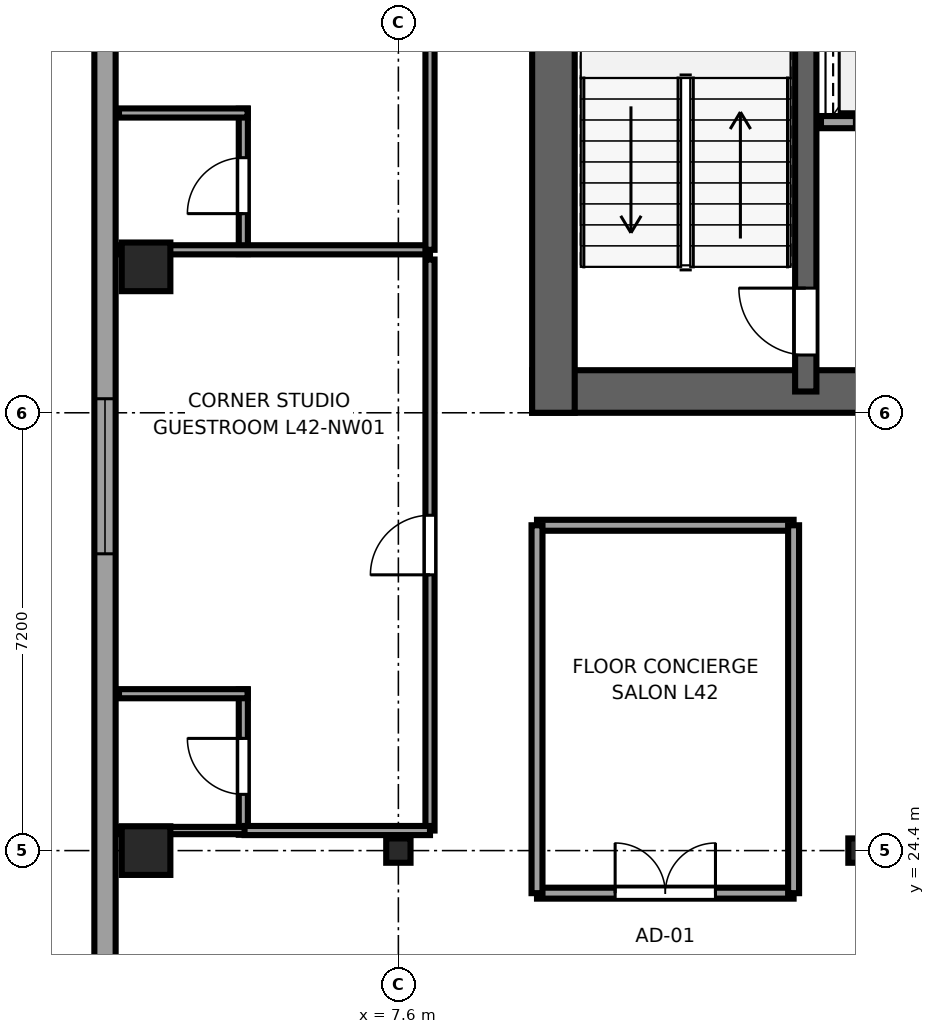
"""IFC4 building model, lengths in metres.
Left out: names, types, materials, properties, quantities, classifications, styles, units other than length and angle.
Written with IfcOpenShell. Run it as: python <this file> out.ifc"""

import sys

from ifc_helpers import new_model, si_unit, direction, frame, frame_2d, origin, origin_2d, place, context, subcontext, project, spatial, rectangle, i_section, extrude, source, transform, mapped, element, fill, save


model = new_model("IFC4")
c1 = context("Model", 3, precision=1e-05, world=origin(), true_north=direction((0.0, 1.0)))
c2 = subcontext(c1, "Body", "Model", "MODEL_VIEW")
j1 = project(units=[si_unit("LENGTHUNIT", "METRE"), si_unit("PLANEANGLEUNIT", "RADIAN")], contexts=[c1])
p1 = place(None, origin())
s1 = spatial("IfcSite", under=j1, at=p1, CompositionType="ELEMENT")
p2 = place(p1, origin())
s2 = spatial("IfcBuilding", under=s1, at=p2, CompositionType="ELEMENT")
p3 = place(p2, frame((0.0, 0.0, 161.25)))
s3 = spatial("IfcBuildingStorey", under=s2, at=p3, CompositionType="ELEMENT", Elevation=161.25)
p4 = place(p3, frame((9.8, 31.95, 0.0), z_axis=(0.0, 0.0, 1.0), x_axis=(1.0, 0.0, 0.0)))
e1 = element("IfcWall", 1, at=p4, inside=s3, PredefinedType="SHEAR", context=c2, shape_type="SweptSolid", body=[
    extrude(rectangle(XDim=26.4, YDim=0.7, at=frame_2d((13.2, 0.0))), origin(), (0.0, 0.0, 1.0), 3.55),
])
p5 = place(p4, frame((7.65, 0.0, 0.0), z_axis=(0.0, 0.0, 1.0), x_axis=(-1.0, 0.0, 0.0)))
e2 = element("IfcOpeningElement", 2, at=p5, cuts=e1, PredefinedType="OPENING", context=c2, shape_type="SweptSolid", body=[
    extrude(rectangle(XDim=1.5, YDim=2.04, at=frame_2d((0.75, 1.02))), frame((0.0, 0.36, 0.0), z_axis=(0.0, -1.0, 0.0), x_axis=(1.0, 0.0, 0.0)), (0.0, 0.0, 1.0), 0.72),
])
p6 = place(p4, frame((13.95, 0.0, 0.0), z_axis=(0.0, 0.0, 1.0), x_axis=(-1.0, 0.0, 0.0)))
e3 = element("IfcOpeningElement", 3, at=p6, cuts=e1, PredefinedType="OPENING", context=c2, shape_type="SweptSolid", body=[
    extrude(rectangle(XDim=1.5, YDim=2.04, at=frame_2d((0.75, 1.02))), frame((0.0, 0.36, 0.0), z_axis=(0.0, -1.0, 0.0), x_axis=(1.0, 0.0, 0.0)), (0.0, 0.0, 1.0), 0.72),
])
p7 = place(p4, frame((20.25, 0.0, 0.0), z_axis=(0.0, 0.0, 1.0), x_axis=(-1.0, 0.0, 0.0)))
e4 = element("IfcOpeningElement", 4, at=p7, cuts=e1, PredefinedType="OPENING", context=c2, shape_type="SweptSolid", body=[
    extrude(rectangle(XDim=1.5, YDim=2.04, at=frame_2d((0.75, 1.02))), frame((0.0, 0.36, 0.0), z_axis=(0.0, -1.0, 0.0), x_axis=(1.0, 0.0, 0.0)), (0.0, 0.0, 1.0), 0.72),
])
p8 = place(p3, frame((10.15, 31.6, 0.0), z_axis=(0.0, 0.0, 1.0), x_axis=(0.0, 1.0, 0.0)))
e5 = element("IfcWall", 5, at=p8, inside=s3, PredefinedType="SHEAR", context=c2, shape_type="SweptSolid", body=[
    extrude(rectangle(XDim=13.6, YDim=0.7, at=frame_2d((6.8, 0.0))), origin(), (0.0, 0.0, 1.0), 3.55),
])
p9 = place(p3, frame((14.3, 31.95, 0.0), z_axis=(0.0, 0.0, 1.0), x_axis=(0.0, 1.0, 0.0)))
e6 = element("IfcWall", 6, at=p9, inside=s3, PredefinedType="SHEAR", context=c2, shape_type="SweptSolid", body=[
    extrude(rectangle(XDim=12.9, YDim=0.35, at=frame_2d((6.45, 0.0))), origin(), (0.0, 0.0, 1.0), 3.55),
])
p10 = place(p9, frame((0.6, 0.0, 0.0)))
e7 = element("IfcOpeningElement", 7, at=p10, cuts=e6, PredefinedType="OPENING", context=c2, shape_type="SweptSolid", body=[
    extrude(rectangle(XDim=1.1, YDim=2.12, at=frame_2d((0.55, 1.06))), frame((0.0, 0.185, 0.0), z_axis=(0.0, -1.0, 0.0), x_axis=(1.0, 0.0, 0.0)), (0.0, 0.0, 1.0), 0.37),
])
m1 = source(origin(), c2, "Body", "SweptSolid", [
    extrude(rectangle(XDim=0.8, YDim=0.8, at=origin_2d()), origin(), (0.0, 0.0, 1.0), 3.55),
])
p11 = place(p3, frame((3.45, 24.4, 0.0), z_axis=(0.0, 0.0, 1.0), x_axis=(1.0, 0.0, 0.0)))
e8 = element("IfcColumn", 8, at=p11, inside=s3, PredefinedType="COLUMN", context=c2, shape_type="MappedRepresentation", body=[
    mapped(m1, transform((0.0, 0.0, 0.0), x_axis=(1.0, 0.0, 0.0), y_axis=(0.0, 1.0, 0.0), z_axis=(0.0, 0.0, 1.0), scale=1.0)),
])
m2 = source(origin(), c2, "Body", "SweptSolid", [
    extrude(i_section(OverallWidth=0.4, OverallDepth=0.4, WebThickness=0.02, FlangeThickness=0.035, at=origin_2d()), origin(), (0.0, 0.0, 1.0), 3.55),
])
for number, where, z_axis, x_axis in (
    (9, (7.6, 24.4, 0.0), (0.0, 0.0, 1.0), (1.0, 0.0, 0.0)),
    (10, (15.2, 24.4, 0.0), (0.0, 0.0, 1.0), (1.0, 0.0, 0.0)),
):
    element("IfcColumn", number, at=place(p3, frame(where, z_axis=z_axis, x_axis=x_axis)), inside=s3, PredefinedType="COLUMN", context=c2, shape_type="MappedRepresentation", body=[
        mapped(m2, transform((0.0, 0.0, 0.0), x_axis=(1.0, 0.0, 0.0), y_axis=(0.0, 1.0, 0.0), z_axis=(0.0, 0.0, 1.0), scale=1.0)),
    ])
p12 = place(p3, frame((3.45, 34.0, 0.0), z_axis=(0.0, 0.0, 1.0), x_axis=(1.0, 0.0, 0.0)))
e11 = element("IfcColumn", 11, at=p12, inside=s3, PredefinedType="COLUMN", context=c2, shape_type="MappedRepresentation", body=[
    mapped(m1, transform((0.0, 0.0, 0.0), x_axis=(1.0, 0.0, 0.0), y_axis=(0.0, 1.0, 0.0), z_axis=(0.0, 0.0, 1.0), scale=1.0)),
])
p13 = place(p3, frame((2.775, 41.583, 0.0), z_axis=(0.0, 0.0, 1.0), x_axis=(0.0, -1.0, 0.0)))
e12 = element("IfcWall", 12, at=p13, inside=s3, PredefinedType="SOLIDWALL", context=c2, shape_type="SweptSolid", body=[
    extrude(rectangle(XDim=34.566, YDim=0.35, at=frame_2d((17.283, 0.0))), origin(), (0.0, 0.0, 1.0), 3.37),
])
p14 = place(p13, frame((1.41, 0.0, 0.68)))
e13 = element("IfcOpeningElement", 13, at=p14, cuts=e12, PredefinedType="OPENING", context=c2, shape_type="SweptSolid", body=[
    extrude(rectangle(XDim=2.55, YDim=1.92, at=frame_2d((1.275, 0.96))), frame((0.0, 0.185, 0.0), z_axis=(0.0, -1.0, 0.0), x_axis=(1.0, 0.0, 0.0)), (0.0, 0.0, 1.0), 0.37),
])
p15 = place(p13, frame((9.752, 0.0, 0.68)))
e14 = element("IfcOpeningElement", 14, at=p15, cuts=e12, PredefinedType="OPENING", context=c2, shape_type="SweptSolid", body=[
    extrude(rectangle(XDim=2.55, YDim=1.92, at=frame_2d((1.275, 0.96))), frame((0.0, 0.185, 0.0), z_axis=(0.0, -1.0, 0.0), x_axis=(1.0, 0.0, 0.0)), (0.0, 0.0, 1.0), 0.37),
])
p16 = place(p13, frame((32.079, 0.0, 0.62)))
e15 = element("IfcOpeningElement", 15, at=p16, cuts=e12, PredefinedType="OPENING", context=c2, shape_type="SweptSolid", body=[
    extrude(rectangle(XDim=1.5, YDim=1.55, at=frame_2d((0.75, 0.775))), frame((0.0, 0.185, 0.0), z_axis=(0.0, -1.0, 0.0), x_axis=(1.0, 0.0, 0.0)), (0.0, 0.0, 1.0), 0.37),
])
p17 = place(p13, frame((28.583, 0.0, 0.62)))
e16 = element("IfcOpeningElement", 16, at=p17, cuts=e12, PredefinedType="OPENING", context=c2, shape_type="SweptSolid", body=[
    extrude(rectangle(XDim=1.5, YDim=1.55, at=frame_2d((0.75, 0.775))), frame((0.0, 0.185, 0.0), z_axis=(0.0, -1.0, 0.0), x_axis=(1.0, 0.0, 0.0)), (0.0, 0.0, 1.0), 0.37),
])
p18 = place(p13, frame((24.883, 0.0, 0.62)))
e17 = element("IfcOpeningElement", 17, at=p18, cuts=e12, PredefinedType="OPENING", context=c2, shape_type="SweptSolid", body=[
    extrude(rectangle(XDim=1.5, YDim=1.55, at=frame_2d((0.75, 0.775))), frame((0.0, 0.185, 0.0), z_axis=(0.0, -1.0, 0.0), x_axis=(1.0, 0.0, 0.0)), (0.0, 0.0, 1.0), 0.37),
])
p19 = place(p13, frame((21.183, 0.0, 0.62)))
e18 = element("IfcOpeningElement", 18, at=p19, cuts=e12, PredefinedType="OPENING", context=c2, shape_type="SweptSolid", body=[
    extrude(rectangle(XDim=1.5, YDim=1.55, at=frame_2d((0.75, 0.775))), frame((0.0, 0.185, 0.0), z_axis=(0.0, -1.0, 0.0), x_axis=(1.0, 0.0, 0.0)), (0.0, 0.0, 1.0), 0.37),
])
p20 = place(p3, frame((14.55, 36.38, 0.0), z_axis=(0.0, 0.0, 1.0), x_axis=(1.0, 0.0, 0.0)))
e19 = element("IfcWall", 19, at=p20, inside=s3, PredefinedType="SOLIDWALL", context=c2, shape_type="SweptSolid", body=[
    extrude(rectangle(XDim=4.075, YDim=0.2, at=frame_2d((2.038, 0.0))), origin(), (0.0, 0.0, 1.0), 3.37),
])
p21 = place(p20, frame((0.55, 0.0, 0.0)))
e20 = element("IfcOpeningElement", 20, at=p21, cuts=e19, PredefinedType="OPENING", context=c2, shape_type="SweptSolid", body=[
    extrude(rectangle(XDim=1.1, YDim=2.12, at=frame_2d((0.55, 1.06))), frame((0.0, 0.11, 0.0), z_axis=(0.0, -1.0, 0.0), x_axis=(1.0, 0.0, 0.0)), (0.0, 0.0, 1.0), 0.22),
])
p22 = place(p20, frame((2.45, 0.0, 0.0)))
e21 = element("IfcOpeningElement", 21, at=p22, cuts=e19, PredefinedType="OPENING", context=c2, shape_type="SweptSolid", body=[
    extrude(rectangle(XDim=1.1, YDim=2.12, at=frame_2d((0.55, 1.06))), frame((0.0, 0.11, 0.0), z_axis=(0.0, -1.0, 0.0), x_axis=(1.0, 0.0, 0.0)), (0.0, 0.0, 1.0), 0.22),
])
p23 = place(p3, frame((5.05, 24.66, 0.0), z_axis=(0.0, 0.0, 1.0), x_axis=(0.0, 1.0, 0.0)))
e22 = element("IfcWall", 22, at=p23, inside=s3, PredefinedType="PARTITIONING", context=c2, shape_type="SweptSolid", body=[
    extrude(rectangle(XDim=2.39, YDim=0.15, at=frame_2d((1.195, 0.0))), origin(), (0.0, 0.0, 1.0), 3.37),
])
p24 = place(p23, frame((0.665, 0.0, 0.0)))
e23 = element("IfcOpeningElement", 23, at=p24, cuts=e22, PredefinedType="OPENING", context=c2, shape_type="SweptSolid", body=[
    extrude(rectangle(XDim=0.92, YDim=2.01, at=frame_2d((0.46, 1.005))), frame((0.0, 0.085, 0.0), z_axis=(0.0, -1.0, 0.0), x_axis=(1.0, 0.0, 0.0)), (0.0, 0.0, 1.0), 0.17),
])
p25 = place(p3, frame((3.005, 24.73, 0.0), z_axis=(0.0, 0.0, 1.0), x_axis=(1.0, 0.0, 0.0)))
e24 = element("IfcWall", 24, at=p25, inside=s3, PredefinedType="PLUMBINGWALL", context=c2, shape_type="SweptSolid", body=[
    extrude(rectangle(XDim=2.115, YDim=0.12, at=frame_2d((1.058, 0.0))), origin(), (0.0, 0.0, 1.0), 3.37),
])
p26 = place(p3, frame((3.005, 26.98, 0.0), z_axis=(0.0, 0.0, 1.0), x_axis=(1.0, 0.0, 0.0)))
e25 = element("IfcWall", 25, at=p26, inside=s3, PredefinedType="PARTITIONING", context=c2, shape_type="SweptSolid", body=[
    extrude(rectangle(XDim=2.115, YDim=0.15, at=frame_2d((1.058, 0.0))), origin(), (0.0, 0.0, 1.0), 3.37),
])
p27 = place(p3, frame((5.05, 34.21, 0.0), z_axis=(0.0, 0.0, 1.0), x_axis=(0.0, 1.0, 0.0)))
e26 = element("IfcWall", 26, at=p27, inside=s3, PredefinedType="PARTITIONING", context=c2, shape_type="SweptSolid", body=[
    extrude(rectangle(XDim=2.39, YDim=0.15, at=frame_2d((1.195, 0.0))), origin(), (0.0, 0.0, 1.0), 3.37),
])
p28 = place(p27, frame((0.665, 0.0, 0.0)))
e27 = element("IfcOpeningElement", 27, at=p28, cuts=e26, PredefinedType="OPENING", context=c2, shape_type="SweptSolid", body=[
    extrude(rectangle(XDim=0.92, YDim=2.01, at=frame_2d((0.46, 1.005))), frame((0.0, 0.085, 0.0), z_axis=(0.0, -1.0, 0.0), x_axis=(1.0, 0.0, 0.0)), (0.0, 0.0, 1.0), 0.17),
])
p29 = place(p3, frame((3.005, 34.28, 0.0), z_axis=(0.0, 0.0, 1.0), x_axis=(1.0, 0.0, 0.0)))
e28 = element("IfcWall", 28, at=p29, inside=s3, PredefinedType="PARTITIONING", context=c2, shape_type="SweptSolid", body=[
    extrude(rectangle(XDim=5.115, YDim=0.15, at=frame_2d((2.558, 0.0))), origin(), (0.0, 0.0, 1.0), 2.16),
])
p30 = place(p3, frame((3.005, 36.53, 0.0), z_axis=(0.0, 0.0, 1.0), x_axis=(1.0, 0.0, 0.0)))
e29 = element("IfcWall", 29, at=p30, inside=s3, PredefinedType="PARTITIONING", context=c2, shape_type="SweptSolid", body=[
    extrude(rectangle(XDim=2.115, YDim=0.15, at=frame_2d((1.058, 0.0))), origin(), (0.0, 0.0, 1.0), 3.37),
])
p31 = place(p3, frame((8.12, 24.73, 0.0), z_axis=(0.0, 0.0, 1.0), x_axis=(0.0, 1.0, 0.0)))
e30 = element("IfcWall", 30, at=p31, inside=s3, PredefinedType="PARTITIONING", context=c2, shape_type="SweptSolid", body=[
    extrude(rectangle(XDim=9.39, YDim=0.15, at=frame_2d((4.695, 0.0))), origin(), (0.0, 0.0, 1.0), 3.37),
])
p32 = place(p31, frame((4.205, 0.0, 0.0)))
e31 = element("IfcOpeningElement", 31, at=p32, cuts=e30, PredefinedType="OPENING", context=c2, shape_type="SweptSolid", body=[
    extrude(rectangle(XDim=0.98, YDim=2.12, at=frame_2d((0.49, 1.06))), frame((0.0, 0.085, 0.0), z_axis=(0.0, -1.0, 0.0), x_axis=(1.0, 0.0, 0.0)), (0.0, 0.0, 1.0), 0.17),
])
p33 = place(p3, frame((5.07, 24.73, 0.0), z_axis=(0.0, 0.0, 1.0), x_axis=(1.0, 0.0, 0.0)))
e32 = element("IfcWall", 32, at=p33, inside=s3, PredefinedType="PARTITIONING", context=c2, shape_type="SweptSolid", body=[
    extrude(rectangle(XDim=3.05, YDim=0.15, at=frame_2d((1.525, 0.0))), origin(), (0.0, 0.0, 1.0), 3.37),
])
p34 = place(p3, frame((8.12, 34.28, 0.0), z_axis=(0.0, 0.0, 1.0), x_axis=(0.0, 1.0, 0.0)))
e33 = element("IfcWall", 33, at=p34, inside=s3, PredefinedType="PARTITIONING", context=c2, shape_type="SweptSolid", body=[
    extrude(rectangle(XDim=11.315, YDim=0.15, at=frame_2d((5.657, 0.0))), origin(), (0.0, 0.0, 1.0), 3.37),
])
p35 = place(p34, frame((4.42, 0.0, 0.0)))
e34 = element("IfcOpeningElement", 34, at=p35, cuts=e33, PredefinedType="OPENING", context=c2, shape_type="SweptSolid", body=[
    extrude(rectangle(XDim=0.98, YDim=2.12, at=frame_2d((0.49, 1.06))), frame((0.0, 0.085, 0.0), z_axis=(0.0, -1.0, 0.0), x_axis=(1.0, 0.0, 0.0)), (0.0, 0.0, 1.0), 0.17),
])
p36 = place(p3, frame((9.88, 23.7, 0.0), z_axis=(0.0, 0.0, 1.0), x_axis=(1.0, 0.0, 0.0)))
e35 = element("IfcWall", 35, at=p36, inside=s3, PredefinedType="PARTITIONING", context=c2, shape_type="SweptSolid", body=[
    extrude(rectangle(XDim=4.22, YDim=0.18, at=frame_2d((2.11, 0.0))), origin(), (0.0, 0.0, 1.0), 3.37),
])
p37 = place(p36, frame((1.285, 0.0, 0.0)))
e36 = element("IfcOpeningElement", 36, at=p37, cuts=e35, PredefinedType="OPENING", context=c2, shape_type="SweptSolid", body=[
    extrude(rectangle(XDim=1.65, YDim=2.15, at=frame_2d((0.825, 1.075))), frame((0.0, 0.1, 0.0), z_axis=(0.0, -1.0, 0.0), x_axis=(1.0, 0.0, 0.0)), (0.0, 0.0, 1.0), 0.2),
])
p38 = place(p3, frame((9.88, 29.75, 0.0), z_axis=(0.0, 0.0, 1.0), x_axis=(1.0, 0.0, 0.0)))
e37 = element("IfcWall", 37, at=p38, inside=s3, PredefinedType="PARTITIONING", context=c2, shape_type="SweptSolid", body=[
    extrude(rectangle(XDim=4.22, YDim=0.18, at=frame_2d((2.11, 0.0))), origin(), (0.0, 0.0, 1.0), 3.37),
])
for number, where, z_axis, x_axis in (
    (38, (9.88, 23.7, 0.0), (0.0, 0.0, 1.0), (0.0, 1.0, 0.0)),
    (39, (14.1, 23.7, 0.0), (0.0, 0.0, 1.0), (0.0, 1.0, 0.0)),
):
    element("IfcWall", number, at=place(p3, frame(where, z_axis=z_axis, x_axis=x_axis)), inside=s3, PredefinedType="PARTITIONING", context=c2, shape_type="SweptSolid", body=[
        extrude(rectangle(XDim=6.05, YDim=0.18, at=frame_2d((3.025, 0.0))), origin(), (0.0, 0.0, 1.0), 3.37),
    ])
m3 = source(origin(), c2, "Body", "SweptSolid", [
    extrude(rectangle(XDim=2.55, YDim=1.92, at=frame_2d((1.275, 0.96))), frame((0.0, 0.09, 0.0), z_axis=(0.0, -1.0, 0.0), x_axis=(1.0, 0.0, 0.0)), (0.0, 0.0, 1.0), 0.06),
])
p39 = place(p15, origin())
e40 = element("IfcWindow", 40, at=p39, inside=s3, PartitioningType="TRIPLE_PANEL_HORIZONTAL", PredefinedType="WINDOW", context=c2, shape_type="MappedRepresentation", body=[
    mapped(m3, transform((0.0, 0.0, 0.0), x_axis=(1.0, 0.0, 0.0), y_axis=(0.0, 1.0, 0.0), z_axis=(0.0, 0.0, 1.0), scale=1.0)),
])
fill(e14, e40)
m4 = source(origin(), c2, "Body", "SweptSolid", [
    extrude(rectangle(XDim=1.1, YDim=2.12, at=frame_2d((0.55, 1.06))), frame((0.0, 0.025, 0.0), z_axis=(0.0, -1.0, 0.0), x_axis=(1.0, 0.0, 0.0)), (0.0, 0.0, 1.0), 0.05),
])
p40 = place(p10, origin())
e41 = element("IfcDoor", 41, at=p40, inside=s3, OperationType="SINGLE_SWING_RIGHT", PredefinedType="DOOR", context=c2, shape_type="MappedRepresentation", body=[
    mapped(m4, transform((0.0, 0.0, 0.0), x_axis=(1.0, 0.0, 0.0), y_axis=(0.0, 1.0, 0.0), z_axis=(0.0, 0.0, 1.0), scale=1.0)),
])
fill(e7, e41)
m5 = source(origin(), c2, "Body", "SweptSolid", [
    extrude(rectangle(XDim=0.92, YDim=2.01, at=frame_2d((0.46, 1.005))), frame((0.0, 0.025, 0.0), z_axis=(0.0, -1.0, 0.0), x_axis=(1.0, 0.0, 0.0)), (0.0, 0.0, 1.0), 0.05),
])
p41 = place(p24, origin())
e42 = element("IfcDoor", 42, at=p41, inside=s3, OperationType="SINGLE_SWING_RIGHT", PredefinedType="DOOR", context=c2, shape_type="MappedRepresentation", body=[
    mapped(m5, transform((0.0, 0.0, 0.0), x_axis=(1.0, 0.0, 0.0), y_axis=(0.0, 1.0, 0.0), z_axis=(0.0, 0.0, 1.0), scale=1.0)),
])
fill(e23, e42)
p42 = place(p28, origin())
e43 = element("IfcDoor", 43, at=p42, inside=s3, OperationType="SINGLE_SWING_LEFT", PredefinedType="DOOR", context=c2, shape_type="MappedRepresentation", body=[
    mapped(m5, transform((0.0, 0.0, 0.0), x_axis=(1.0, 0.0, 0.0), y_axis=(0.0, 1.0, 0.0), z_axis=(0.0, 0.0, 1.0), scale=1.0)),
])
fill(e27, e43)
m6 = source(origin(), c2, "Body", "SweptSolid", [
    extrude(rectangle(XDim=0.98, YDim=2.12, at=frame_2d((0.49, 1.06))), frame((0.0, 0.025, 0.0), z_axis=(0.0, -1.0, 0.0), x_axis=(1.0, 0.0, 0.0)), (0.0, 0.0, 1.0), 0.05),
])
p43 = place(p32, origin())
e44 = element("IfcDoor", 44, at=p43, inside=s3, OperationType="SINGLE_SWING_LEFT", PredefinedType="DOOR", context=c2, shape_type="MappedRepresentation", body=[
    mapped(m6, transform((0.0, 0.0, 0.0), x_axis=(1.0, 0.0, 0.0), y_axis=(0.0, 1.0, 0.0), z_axis=(0.0, 0.0, 1.0), scale=1.0)),
])
fill(e31, e44)
m7 = source(origin(), c2, "Body", "SweptSolid", [
    extrude(rectangle(XDim=1.65, YDim=2.15, at=frame_2d((0.825, 1.075))), frame((0.0, 0.025, 0.0), z_axis=(0.0, -1.0, 0.0), x_axis=(1.0, 0.0, 0.0)), (0.0, 0.0, 1.0), 0.05),
])
p44 = place(p37, origin())
e45 = element("IfcDoor", 45, at=p44, inside=s3, OperationType="DOUBLE_DOOR_SINGLE_SWING", PredefinedType="DOOR", context=c2, shape_type="MappedRepresentation", body=[
    mapped(m7, transform((0.0, 0.0, 0.0), x_axis=(1.0, 0.0, 0.0), y_axis=(0.0, 1.0, 0.0), z_axis=(0.0, 0.0, 1.0), scale=1.0)),
])
fill(e36, e45)
save(model, sys.argv[1])
